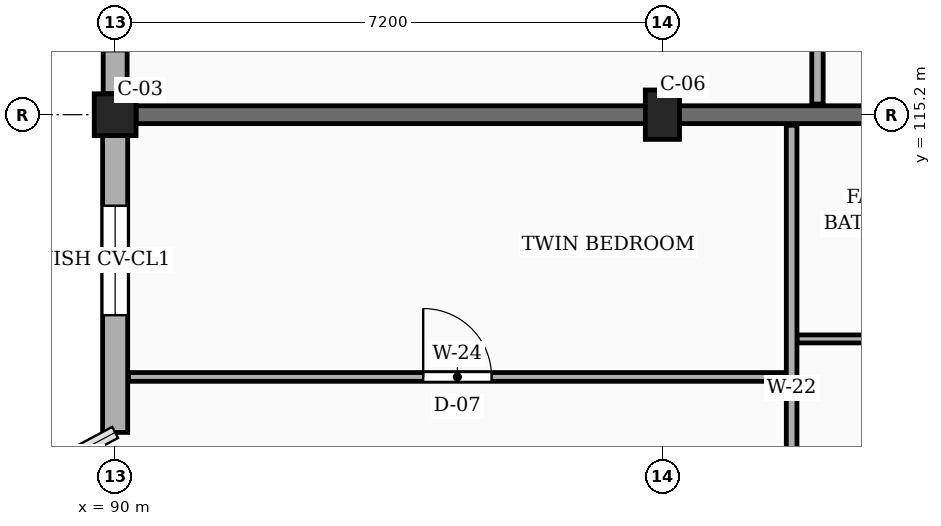
"""IFC4 building model, lengths in metres.
Left out: names, types, materials, properties, quantities, classifications, styles, units other than length and angle.
Written with IfcOpenShell. Run it as: python <this file> out.ifc"""

import sys

from ifc_helpers import new_model, si_unit, direction, frame, frame_2d, origin, origin_2d, place, context, subcontext, project, spatial, rectangle, extrude, element, fill, save


model = new_model("IFC4")
c1 = context("Model", 3, precision=1e-05, world=origin(), true_north=direction((0.0, 1.0)))
c2 = subcontext(c1, "Body", "Model", "MODEL_VIEW")
j1 = project(units=[si_unit("LENGTHUNIT", "METRE"), si_unit("PLANEANGLEUNIT", "RADIAN")], contexts=[c1])
p1 = place(None, origin())
s1 = spatial("IfcSite", under=j1, at=p1, CompositionType="ELEMENT")
p2 = place(p1, origin())
s2 = spatial("IfcBuilding", under=s1, at=p2, CompositionType="ELEMENT")
p3 = place(p2, frame((0.0, 0.0, 13.95)))
s3 = spatial("IfcBuildingStorey", under=s2, at=p3, CompositionType="ELEMENT", Elevation=13.95)
p4 = place(p3, frame((90.0, 115.2, 0.0), z_axis=(0.0, 0.0, 1.0), x_axis=(1.0, 0.0, 0.0)))
e1 = element("IfcColumn", 1, at=p4, inside=s3, PredefinedType="COLUMN", context=c2, shape_type="SweptSolid", body=[
    extrude(rectangle(XDim=0.55, YDim=0.55, at=origin_2d()), origin(), (0.0, 0.0, 1.0), 3.15),
])
p5 = place(p3, frame((97.2, 115.2, 0.0), z_axis=(0.0, 0.0, 1.0), x_axis=(1.0, 0.0, 0.0)))
e2 = element("IfcColumn", 2, at=p5, inside=s3, PredefinedType="COLUMN", context=c2, shape_type="SweptSolid", body=[
    extrude(rectangle(XDim=0.45, YDim=0.65, at=origin_2d()), origin(), (0.0, 0.0, 1.0), 3.15),
])
p6 = place(p3, frame((90.275, 115.2, 0.0), z_axis=(0.0, 0.0, 1.0), x_axis=(1.0, 0.0, 0.0)))
e3 = element("IfcWall", 3, at=p6, inside=s3, PredefinedType="SOLIDWALL", context=c2, shape_type="SweptSolid", body=[
    extrude(rectangle(XDim=12.025, YDim=0.235, at=frame_2d((6.013, 0.0))), origin(), (0.0, 0.0, 1.0), 2.19),
])
p7 = place(p3, frame((90.0, 122.125, 0.0), z_axis=(0.0, 0.0, 1.0), x_axis=(0.0, -1.0, 0.0)))
e4 = element("IfcWall", 4, at=p7, inside=s3, PredefinedType="SOLIDWALL", context=c2, shape_type="SweptSolid", body=[
    extrude(rectangle(XDim=6.65, YDim=0.315, at=frame_2d((3.325, 0.0))), origin(), (0.0, 0.0, 1.0), 2.46),
])
p8 = place(p7, frame((0.45, 0.0, 0.78)))
e5 = element("IfcOpeningElement", 5, at=p8, cuts=e4, PredefinedType="OPENING", context=c2, shape_type="SweptSolid", body=[
    extrude(rectangle(XDim=1.28, YDim=1.26, at=frame_2d((0.64, 0.63))), frame((0.0, 0.167, 0.0), z_axis=(0.0, -1.0, 0.0), x_axis=(1.0, 0.0, 0.0)), (0.0, 0.0, 1.0), 0.335),
])
p9 = place(p7, frame((4.65, 0.0, 0.78)))
e6 = element("IfcOpeningElement", 6, at=p9, cuts=e4, PredefinedType="OPENING", context=c2, shape_type="SweptSolid", body=[
    extrude(rectangle(XDim=1.44, YDim=1.26, at=frame_2d((0.72, 0.63))), frame((0.0, 0.167, 0.0), z_axis=(0.0, -1.0, 0.0), x_axis=(1.0, 0.0, 0.0)), (0.0, 0.0, 1.0), 0.335),
])
p10 = place(p3, frame((90.0, 114.925, 0.0), z_axis=(0.0, 0.0, 1.0), x_axis=(0.0, -1.0, 0.0)))
e7 = element("IfcWall", 7, at=p10, inside=s3, PredefinedType="SOLIDWALL", context=c2, shape_type="SweptSolid", body=[
    extrude(rectangle(XDim=3.905, YDim=0.33, at=frame_2d((1.953, 0.0))), origin(), (0.0, 0.0, 1.0), 2.46),
])
p11 = place(p10, frame((0.923, 0.0, 0.78)))
e8 = element("IfcOpeningElement", 8, at=p11, cuts=e7, PredefinedType="OPENING", context=c2, shape_type="SweptSolid", body=[
    extrude(rectangle(XDim=1.44, YDim=1.26, at=frame_2d((0.72, 0.63))), frame((0.0, 0.175, 0.0), z_axis=(0.0, -1.0, 0.0), x_axis=(1.0, 0.0, 0.0)), (0.0, 0.0, 1.0), 0.35),
])
p12 = place(p3, frame((90.175, 111.75, 0.0), z_axis=(0.0, 0.0, 1.0), x_axis=(1.0, 0.0, 0.0)))
e9 = element("IfcWall", 9, at=p12, inside=s3, PredefinedType="PARTITIONING", context=c2, shape_type="SweptSolid", body=[
    extrude(rectangle(XDim=8.655, YDim=0.115, at=frame_2d((4.328, 0.0))), origin(), (0.0, 0.0, 1.0), 2.325),
])
p13 = place(p12, frame((3.877, 0.0, 0.0)))
e10 = element("IfcOpeningElement", 10, at=p13, cuts=e9, PredefinedType="OPENING", context=c2, shape_type="SweptSolid", body=[
    extrude(rectangle(XDim=0.9, YDim=2.1, at=frame_2d((0.45, 1.05))), frame((0.0, 0.067, 0.0), z_axis=(0.0, -1.0, 0.0), x_axis=(1.0, 0.0, 0.0)), (0.0, 0.0, 1.0), 0.135),
])
p14 = place(p3, frame((98.97, 112.25, 0.0), z_axis=(0.0, 0.0, 1.0), x_axis=(1.0, 0.0, 0.0)))
e11 = element("IfcWall", 11, at=p14, inside=s3, PredefinedType="PARTITIONING", context=c2, shape_type="SweptSolid", body=[
    extrude(rectangle(XDim=3.24, YDim=0.105, at=frame_2d((1.62, 0.0))), origin(), (0.0, 0.0, 1.0), 2.325),
])
p15 = place(p14, frame((1.17, 0.0, 0.0)))
e12 = element("IfcOpeningElement", 12, at=p15, cuts=e11, PredefinedType="OPENING", context=c2, shape_type="SweptSolid", body=[
    extrude(rectangle(XDim=0.9, YDim=2.05, at=frame_2d((0.45, 1.025))), frame((0.0, 0.062, 0.0), z_axis=(0.0, -1.0, 0.0), x_axis=(1.0, 0.0, 0.0)), (0.0, 0.0, 1.0), 0.125),
])
p16 = place(p3, frame((98.9, 108.14, 0.0), z_axis=(0.0, 0.0, 1.0), x_axis=(0.0, 1.0, 0.0)))
e13 = element("IfcWall", 13, at=p16, inside=s3, PredefinedType="PARTITIONING", context=c2, shape_type="SweptSolid", body=[
    extrude(rectangle(XDim=6.92, YDim=0.14, at=frame_2d((3.46, 0.0))), origin(), (0.0, 0.0, 1.0), 2.325),
])
p17 = place(p16, frame((1.31, 0.0, 0.0)))
e14 = element("IfcOpeningElement", 14, at=p17, cuts=e13, PredefinedType="OPENING", context=c2, shape_type="SweptSolid", body=[
    extrude(rectangle(XDim=0.95, YDim=2.1, at=frame_2d((0.475, 1.05))), frame((0.0, 0.08, 0.0), z_axis=(0.0, -1.0, 0.0), x_axis=(1.0, 0.0, 0.0)), (0.0, 0.0, 1.0), 0.16),
])
p18 = place(p3, frame((99.24, 115.34, 0.0), z_axis=(0.0, 0.0, 1.0), x_axis=(0.0, 1.0, 0.0)))
e15 = element("IfcWall", 15, at=p18, inside=s3, PredefinedType="PARTITIONING", context=c2, shape_type="SweptSolid", body=[
    extrude(rectangle(XDim=6.92, YDim=0.15, at=frame_2d((3.46, 0.0))), origin(), (0.0, 0.0, 1.0), 2.325),
])
p19 = place(p18, frame((1.31, 0.0, 0.0)))
e16 = element("IfcOpeningElement", 16, at=p19, cuts=e15, PredefinedType="OPENING", context=c2, shape_type="SweptSolid", body=[
    extrude(rectangle(XDim=0.92, YDim=2.1, at=frame_2d((0.46, 1.05))), frame((0.0, 0.085, 0.0), z_axis=(0.0, -1.0, 0.0), x_axis=(1.0, 0.0, 0.0)), (0.0, 0.0, 1.0), 0.17),
])
p20 = place(p11, origin())
e17 = element("IfcWindow", 17, at=p20, inside=s3, PartitioningType="SINGLE_PANEL", PredefinedType="WINDOW", context=c2, shape_type="SweptSolid", body=[
    extrude(rectangle(XDim=1.44, YDim=1.26, at=frame_2d((0.72, 0.63))), frame((0.0, 0.03, 0.0), z_axis=(0.0, -1.0, 0.0), x_axis=(1.0, 0.0, 0.0)), (0.0, 0.0, 1.0), 0.06),
])
fill(e8, e17)
p21 = place(p13, origin())
e18 = element("IfcDoor", 18, at=p21, inside=s3, OperationType="SINGLE_SWING_LEFT", PredefinedType="DOOR", context=c2, shape_type="SweptSolid", body=[
    extrude(rectangle(XDim=0.9, YDim=2.1, at=frame_2d((0.45, 1.05))), frame((0.0, 0.025, 0.0), z_axis=(0.0, -1.0, 0.0), x_axis=(1.0, 0.0, 0.0)), (0.0, 0.0, 1.0), 0.05),
])
fill(e10, e18)
save(model, sys.argv[1])
